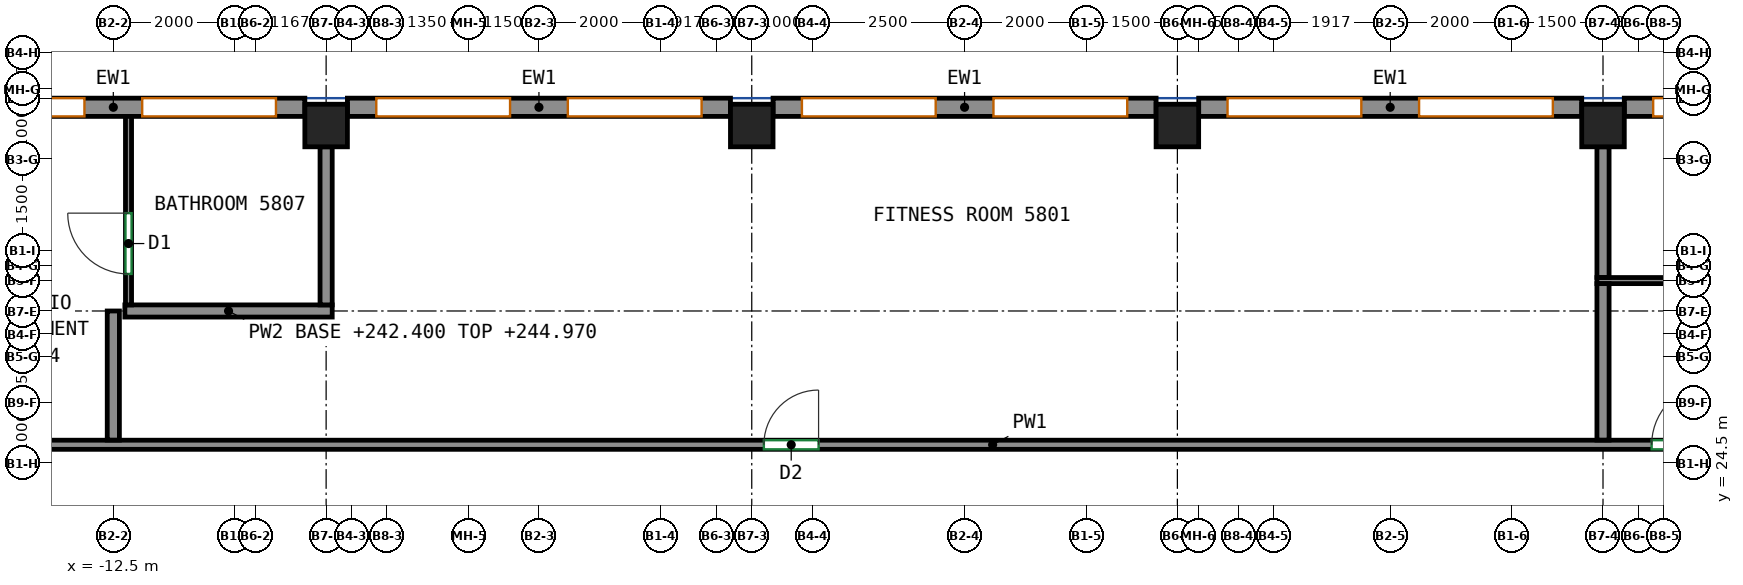
"""IFC4 building model, lengths in metres.
Left out: names, types, materials, properties, quantities, classifications, styles, units other than length and angle.
Written with IfcOpenShell. Run it as: python <this file> out.ifc"""

import sys

from ifc_helpers import new_model, si_unit, direction, frame, frame_2d, origin, origin_2d, place, context, subcontext, project, spatial, rectangle, extrude, source, transform, mapped, element, fill, save


model = new_model("IFC4")
c1 = context("Model", 3, precision=1e-05, world=origin(), true_north=direction((0.0, 1.0)))
c2 = subcontext(c1, "Body", "Model", "MODEL_VIEW")
j1 = project(units=[si_unit("LENGTHUNIT", "METRE"), si_unit("PLANEANGLEUNIT", "RADIAN")], contexts=[c1])
p1 = place(None, origin())
s1 = spatial("IfcSite", under=j1, at=p1, CompositionType="ELEMENT")
p2 = place(p1, origin())
s2 = spatial("IfcBuilding", under=s1, at=p2, CompositionType="ELEMENT")
p3 = place(p2, frame((0.0, 0.0, 242.4)))
s3 = spatial("IfcBuildingStorey", under=s2, at=p3, CompositionType="ELEMENT", Elevation=242.4)
m1 = source(origin(), c2, "Body", "SweptSolid", [
    extrude(rectangle(XDim=0.7, YDim=0.7, at=origin_2d()), origin(), (0.0, 0.0, 1.0), 3.12),
])
for number, where, z_axis, x_axis in (
    (1, (-9.0, 30.05, 0.0), (0.0, 0.0, 1.0), (1.0, 0.0, 0.0)),
    (2, (-2.0, 30.05, 0.0), (0.0, 0.0, 1.0), (1.0, 0.0, 0.0)),
    (3, (5.0, 30.05, 0.0), (0.0, 0.0, 1.0), (1.0, 0.0, 0.0)),
    (4, (12.0, 30.05, 0.0), (0.0, 0.0, 1.0), (1.0, 0.0, 0.0)),
):
    element("IfcColumn", number, at=place(p3, frame(where, z_axis=z_axis, x_axis=x_axis)), inside=s3, PredefinedType="COLUMN", context=c2, shape_type="MappedRepresentation", body=[
        mapped(m1, transform((0.0, 0.0, 0.0))),
    ])
m2 = source(origin(), c2, "Body", "SweptSolid", [
    extrude(rectangle(XDim=6.3, YDim=0.3, at=frame_2d((3.15, 0.0))), origin(), (0.0, 0.0, 1.0), 3.12),
])
p4 = place(p3, frame((18.65, 30.35, 0.0), z_axis=(0.0, 0.0, 1.0), x_axis=(-1.0, 0.0, 0.0)))
e5 = element("IfcWall", 5, at=p4, inside=s3, PredefinedType="SOLIDWALL", context=c2, shape_type="MappedRepresentation", body=[
    mapped(m2, transform((0.0, 0.0, 0.0))),
])
p5 = place(p4, frame((0.475, 0.0, 0.8)))
e6 = element("IfcOpeningElement", 6, at=p5, cuts=e5, PredefinedType="OPENING", context=c2, shape_type="SweptSolid", body=[
    extrude(rectangle(XDim=2.2, YDim=2.05, at=frame_2d((1.1, 1.025))), frame((0.0, 0.16, 0.0), z_axis=(0.0, -1.0, 0.0), x_axis=(1.0, 0.0, 0.0)), (0.0, 0.0, 1.0), 0.32),
])
p6 = place(p4, frame((3.625, 0.0, 0.8)))
e7 = element("IfcOpeningElement", 7, at=p6, cuts=e5, PredefinedType="OPENING", context=c2, shape_type="SweptSolid", body=[
    extrude(rectangle(XDim=2.2, YDim=2.05, at=frame_2d((1.1, 1.025))), frame((0.0, 0.16, 0.0), z_axis=(0.0, -1.0, 0.0), x_axis=(1.0, 0.0, 0.0)), (0.0, 0.0, 1.0), 0.32),
])
p7 = place(p3, frame((11.65, 30.35, 0.0), z_axis=(0.0, 0.0, 1.0), x_axis=(-1.0, 0.0, 0.0)))
e8 = element("IfcWall", 8, at=p7, inside=s3, PredefinedType="SOLIDWALL", context=c2, shape_type="MappedRepresentation", body=[
    mapped(m2, transform((0.0, 0.0, 0.0))),
])
p8 = place(p7, frame((0.475, 0.0, 0.8)))
e9 = element("IfcOpeningElement", 9, at=p8, cuts=e8, PredefinedType="OPENING", context=c2, shape_type="SweptSolid", body=[
    extrude(rectangle(XDim=2.2, YDim=2.05, at=frame_2d((1.1, 1.025))), frame((0.0, 0.16, 0.0), z_axis=(0.0, -1.0, 0.0), x_axis=(1.0, 0.0, 0.0)), (0.0, 0.0, 1.0), 0.32),
])
p9 = place(p7, frame((3.625, 0.0, 0.8)))
e10 = element("IfcOpeningElement", 10, at=p9, cuts=e8, PredefinedType="OPENING", context=c2, shape_type="SweptSolid", body=[
    extrude(rectangle(XDim=2.2, YDim=2.05, at=frame_2d((1.1, 1.025))), frame((0.0, 0.16, 0.0), z_axis=(0.0, -1.0, 0.0), x_axis=(1.0, 0.0, 0.0)), (0.0, 0.0, 1.0), 0.32),
])
p10 = place(p3, frame((4.65, 30.35, 0.0), z_axis=(0.0, 0.0, 1.0), x_axis=(-1.0, 0.0, 0.0)))
e11 = element("IfcWall", 11, at=p10, inside=s3, PredefinedType="SOLIDWALL", context=c2, shape_type="MappedRepresentation", body=[
    mapped(m2, transform((0.0, 0.0, 0.0))),
])
p11 = place(p10, frame((0.475, 0.0, 0.8)))
e12 = element("IfcOpeningElement", 12, at=p11, cuts=e11, PredefinedType="OPENING", context=c2, shape_type="SweptSolid", body=[
    extrude(rectangle(XDim=2.2, YDim=2.05, at=frame_2d((1.1, 1.025))), frame((0.0, 0.16, 0.0), z_axis=(0.0, -1.0, 0.0), x_axis=(1.0, 0.0, 0.0)), (0.0, 0.0, 1.0), 0.32),
])
p12 = place(p10, frame((3.625, 0.0, 0.8)))
e13 = element("IfcOpeningElement", 13, at=p12, cuts=e11, PredefinedType="OPENING", context=c2, shape_type="SweptSolid", body=[
    extrude(rectangle(XDim=2.2, YDim=2.05, at=frame_2d((1.1, 1.025))), frame((0.0, 0.16, 0.0), z_axis=(0.0, -1.0, 0.0), x_axis=(1.0, 0.0, 0.0)), (0.0, 0.0, 1.0), 0.32),
])
p13 = place(p3, frame((-2.35, 30.35, 0.0), z_axis=(0.0, 0.0, 1.0), x_axis=(-1.0, 0.0, 0.0)))
e14 = element("IfcWall", 14, at=p13, inside=s3, PredefinedType="SOLIDWALL", context=c2, shape_type="MappedRepresentation", body=[
    mapped(m2, transform((0.0, 0.0, 0.0))),
])
p14 = place(p13, frame((0.475, 0.0, 0.8)))
e15 = element("IfcOpeningElement", 15, at=p14, cuts=e14, PredefinedType="OPENING", context=c2, shape_type="SweptSolid", body=[
    extrude(rectangle(XDim=2.2, YDim=2.05, at=frame_2d((1.1, 1.025))), frame((0.0, 0.16, 0.0), z_axis=(0.0, -1.0, 0.0), x_axis=(1.0, 0.0, 0.0)), (0.0, 0.0, 1.0), 0.32),
])
p15 = place(p13, frame((3.625, 0.0, 0.8)))
e16 = element("IfcOpeningElement", 16, at=p15, cuts=e14, PredefinedType="OPENING", context=c2, shape_type="SweptSolid", body=[
    extrude(rectangle(XDim=2.2, YDim=2.05, at=frame_2d((1.1, 1.025))), frame((0.0, 0.16, 0.0), z_axis=(0.0, -1.0, 0.0), x_axis=(1.0, 0.0, 0.0)), (0.0, 0.0, 1.0), 0.32),
])
p16 = place(p3, frame((-9.35, 30.35, 0.0), z_axis=(0.0, 0.0, 1.0), x_axis=(-1.0, 0.0, 0.0)))
e17 = element("IfcWall", 17, at=p16, inside=s3, PredefinedType="SOLIDWALL", context=c2, shape_type="MappedRepresentation", body=[
    mapped(m2, transform((0.0, 0.0, 0.0))),
])
p17 = place(p16, frame((0.475, 0.0, 0.8)))
e18 = element("IfcOpeningElement", 18, at=p17, cuts=e17, PredefinedType="OPENING", context=c2, shape_type="SweptSolid", body=[
    extrude(rectangle(XDim=2.2, YDim=2.05, at=frame_2d((1.1, 1.025))), frame((0.0, 0.16, 0.0), z_axis=(0.0, -1.0, 0.0), x_axis=(1.0, 0.0, 0.0)), (0.0, 0.0, 1.0), 0.32),
])
p18 = place(p16, frame((3.625, 0.0, 0.8)))
e19 = element("IfcOpeningElement", 19, at=p18, cuts=e17, PredefinedType="OPENING", context=c2, shape_type="SweptSolid", body=[
    extrude(rectangle(XDim=2.2, YDim=2.05, at=frame_2d((1.1, 1.025))), frame((0.0, 0.16, 0.0), z_axis=(0.0, -1.0, 0.0), x_axis=(1.0, 0.0, 0.0)), (0.0, 0.0, 1.0), 0.32),
])
p19 = place(p3, frame((-16.075, 24.8, 0.0), z_axis=(0.0, 0.0, 1.0), x_axis=(1.0, 0.0, 0.0)))
e20 = element("IfcWall", 20, at=p19, inside=s3, PredefinedType="PARTITIONING", context=c2, shape_type="SweptSolid", body=[
    extrude(rectangle(XDim=36.073, YDim=0.15, at=frame_2d((18.037, 0.0))), origin(), (0.0, 0.0, 1.0), 3.12),
])
p20 = place(p19, frame((14.274, 0.0, 0.0)))
e21 = element("IfcOpeningElement", 21, at=p20, cuts=e20, PredefinedType="OPENING", context=c2, shape_type="SweptSolid", body=[
    extrude(rectangle(XDim=0.9, YDim=2.1, at=frame_2d((0.45, 1.05))), frame((0.0, 0.085, 0.0), z_axis=(0.0, -1.0, 0.0), x_axis=(1.0, 0.0, 0.0)), (0.0, 0.0, 1.0), 0.17),
])
p21 = place(p19, frame((28.875, 0.0, 0.0)))
e22 = element("IfcOpeningElement", 22, at=p21, cuts=e20, PredefinedType="OPENING", context=c2, shape_type="SweptSolid", body=[
    extrude(rectangle(XDim=1.0, YDim=2.1, at=frame_2d((0.5, 1.05))), frame((0.0, 0.085, 0.0), z_axis=(0.0, -1.0, 0.0), x_axis=(1.0, 0.0, 0.0)), (0.0, 0.0, 1.0), 0.17),
])
p22 = place(p3, frame((11.9, 27.5, 0.0), z_axis=(0.0, 0.0, 1.0), x_axis=(1.0, 0.0, 0.0)))
e23 = element("IfcWall", 23, at=p22, inside=s3, PredefinedType="PARTITIONING", context=c2, shape_type="SweptSolid", body=[
    extrude(rectangle(XDim=10.66, YDim=0.1, at=frame_2d((5.33, 0.0))), origin(), (0.0, 0.0, 1.0), 3.12),
])
p23 = place(p22, frame((2.02, 0.0, 0.0)))
e24 = element("IfcOpeningElement", 24, at=p23, cuts=e23, PredefinedType="OPENING", context=c2, shape_type="SweptSolid", body=[
    extrude(rectangle(XDim=1.0, YDim=2.1, at=frame_2d((0.5, 1.05))), frame((0.0, 0.06, 0.0), z_axis=(0.0, -1.0, 0.0), x_axis=(1.0, 0.0, 0.0)), (0.0, 0.0, 1.0), 0.12),
])
p24 = place(p3, frame((12.0, 24.877, 0.0), z_axis=(0.0, 0.0, 1.0), x_axis=(0.0, 1.0, 0.0)))
e25 = element("IfcWall", 25, at=p24, inside=s3, PredefinedType="PARTITIONING", context=c2, shape_type="SweptSolid", body=[
    extrude(rectangle(XDim=2.573, YDim=0.2, at=frame_2d((1.287, 0.0))), origin(), (0.0, 0.0, 1.0), 3.12),
])
p25 = place(p3, frame((12.0, 27.552, 0.0), z_axis=(0.0, 0.0, 1.0), x_axis=(0.0, 1.0, 0.0)))
e26 = element("IfcWall", 26, at=p25, inside=s3, PredefinedType="PARTITIONING", context=c2, shape_type="SweptSolid", body=[
    extrude(rectangle(XDim=2.148, YDim=0.2, at=frame_2d((1.074, 0.0))), origin(), (0.0, 0.0, 1.0), 3.12),
])
p26 = place(p3, frame((-12.5, 27.0, 0.0), z_axis=(0.0, 0.0, 1.0), x_axis=(0.0, -1.0, 0.0)))
e27 = element("IfcWall", 27, at=p26, inside=s3, PredefinedType="PARTITIONING", context=c2, shape_type="SweptSolid", body=[
    extrude(rectangle(XDim=2.123, YDim=0.2, at=frame_2d((1.062, 0.0))), origin(), (0.0, 0.0, 1.0), 3.12),
])
p27 = place(p3, frame((-8.9, 27.0, 0.0), z_axis=(0.0, 0.0, 1.0), x_axis=(-1.0, 0.0, 0.0)))
e28 = element("IfcWall", 28, at=p27, inside=s3, PredefinedType="PARTITIONING", context=c2, shape_type="SweptSolid", body=[
    extrude(rectangle(XDim=3.41, YDim=0.2, at=frame_2d((1.705, 0.0))), origin(), (0.0, 0.0, 1.0), 2.57),
])
p28 = place(p3, frame((-9.0, 27.1, 0.0), z_axis=(0.0, 0.0, 1.0), x_axis=(0.0, 1.0, 0.0)))
e29 = element("IfcWall", 29, at=p28, inside=s3, PredefinedType="PARTITIONING", context=c2, shape_type="SweptSolid", body=[
    extrude(rectangle(XDim=2.6, YDim=0.2, at=frame_2d((1.3, 0.0))), origin(), (0.0, 0.0, 1.0), 3.12),
])
p29 = place(p3, frame((-12.25, 27.1, 0.0), z_axis=(0.0, 0.0, 1.0), x_axis=(0.0, 1.0, 0.0)))
e30 = element("IfcWall", 30, at=p29, inside=s3, PredefinedType="PARTITIONING", context=c2, shape_type="SweptSolid", body=[
    extrude(rectangle(XDim=3.15, YDim=0.1, at=frame_2d((1.575, 0.0))), origin(), (0.0, 0.0, 1.0), 3.12),
])
p30 = place(p29, frame((0.509, 0.0, 0.0)))
e31 = element("IfcOpeningElement", 31, at=p30, cuts=e30, PredefinedType="OPENING", context=c2, shape_type="SweptSolid", body=[
    extrude(rectangle(XDim=1.0, YDim=2.1, at=frame_2d((0.5, 1.05))), frame((0.0, 0.06, 0.0), z_axis=(0.0, -1.0, 0.0), x_axis=(1.0, 0.0, 0.0)), (0.0, 0.0, 1.0), 0.12),
])
p31 = place(p6, origin())
e32 = element("IfcWindow", 32, at=p31, inside=s3, PartitioningType="SINGLE_PANEL", PredefinedType="WINDOW", context=c2, shape_type="SweptSolid", body=[
    extrude(rectangle(XDim=2.2, YDim=2.05, at=frame_2d((1.1, 1.025))), frame((0.0, 0.03, 0.0), z_axis=(0.0, -1.0, 0.0), x_axis=(1.0, 0.0, 0.0)), (0.0, 0.0, 1.0), 0.06),
])
fill(e7, e32)
p32 = place(p8, origin())
e33 = element("IfcWindow", 33, at=p32, inside=s3, PartitioningType="SINGLE_PANEL", PredefinedType="WINDOW", context=c2, shape_type="SweptSolid", body=[
    extrude(rectangle(XDim=2.2, YDim=2.05, at=frame_2d((1.1, 1.025))), frame((0.0, 0.03, 0.0), z_axis=(0.0, -1.0, 0.0), x_axis=(1.0, 0.0, 0.0)), (0.0, 0.0, 1.0), 0.06),
])
fill(e9, e33)
p33 = place(p9, origin())
e34 = element("IfcWindow", 34, at=p33, inside=s3, PartitioningType="SINGLE_PANEL", PredefinedType="WINDOW", context=c2, shape_type="SweptSolid", body=[
    extrude(rectangle(XDim=2.2, YDim=2.05, at=frame_2d((1.1, 1.025))), frame((0.0, 0.03, 0.0), z_axis=(0.0, -1.0, 0.0), x_axis=(1.0, 0.0, 0.0)), (0.0, 0.0, 1.0), 0.06),
])
fill(e10, e34)
p34 = place(p11, origin())
e35 = element("IfcWindow", 35, at=p34, inside=s3, PartitioningType="SINGLE_PANEL", PredefinedType="WINDOW", context=c2, shape_type="SweptSolid", body=[
    extrude(rectangle(XDim=2.2, YDim=2.05, at=frame_2d((1.1, 1.025))), frame((0.0, 0.03, 0.0), z_axis=(0.0, -1.0, 0.0), x_axis=(1.0, 0.0, 0.0)), (0.0, 0.0, 1.0), 0.06),
])
fill(e12, e35)
p35 = place(p12, origin())
e36 = element("IfcWindow", 36, at=p35, inside=s3, PartitioningType="SINGLE_PANEL", PredefinedType="WINDOW", context=c2, shape_type="SweptSolid", body=[
    extrude(rectangle(XDim=2.2, YDim=2.05, at=frame_2d((1.1, 1.025))), frame((0.0, 0.03, 0.0), z_axis=(0.0, -1.0, 0.0), x_axis=(1.0, 0.0, 0.0)), (0.0, 0.0, 1.0), 0.06),
])
fill(e13, e36)
p36 = place(p14, origin())
e37 = element("IfcWindow", 37, at=p36, inside=s3, PartitioningType="SINGLE_PANEL", PredefinedType="WINDOW", context=c2, shape_type="SweptSolid", body=[
    extrude(rectangle(XDim=2.2, YDim=2.05, at=frame_2d((1.1, 1.025))), frame((0.0, 0.03, 0.0), z_axis=(0.0, -1.0, 0.0), x_axis=(1.0, 0.0, 0.0)), (0.0, 0.0, 1.0), 0.06),
])
fill(e15, e37)
p37 = place(p15, origin())
e38 = element("IfcWindow", 38, at=p37, inside=s3, PartitioningType="SINGLE_PANEL", PredefinedType="WINDOW", context=c2, shape_type="SweptSolid", body=[
    extrude(rectangle(XDim=2.2, YDim=2.05, at=frame_2d((1.1, 1.025))), frame((0.0, 0.03, 0.0), z_axis=(0.0, -1.0, 0.0), x_axis=(1.0, 0.0, 0.0)), (0.0, 0.0, 1.0), 0.06),
])
fill(e16, e38)
p38 = place(p17, origin())
e39 = element("IfcWindow", 39, at=p38, inside=s3, PartitioningType="SINGLE_PANEL", PredefinedType="WINDOW", context=c2, shape_type="SweptSolid", body=[
    extrude(rectangle(XDim=2.2, YDim=2.05, at=frame_2d((1.1, 1.025))), frame((0.0, 0.03, 0.0), z_axis=(0.0, -1.0, 0.0), x_axis=(1.0, 0.0, 0.0)), (0.0, 0.0, 1.0), 0.06),
])
fill(e18, e39)
p39 = place(p18, origin())
e40 = element("IfcWindow", 40, at=p39, inside=s3, PartitioningType="SINGLE_PANEL", PredefinedType="WINDOW", context=c2, shape_type="SweptSolid", body=[
    extrude(rectangle(XDim=2.2, YDim=2.05, at=frame_2d((1.1, 1.025))), frame((0.0, 0.03, 0.0), z_axis=(0.0, -1.0, 0.0), x_axis=(1.0, 0.0, 0.0)), (0.0, 0.0, 1.0), 0.06),
])
fill(e19, e40)
p40 = place(p20, origin())
e41 = element("IfcDoor", 41, at=p40, inside=s3, OperationType="SINGLE_SWING_RIGHT", PredefinedType="DOOR", context=c2, shape_type="SweptSolid", body=[
    extrude(rectangle(XDim=0.9, YDim=2.1, at=frame_2d((0.45, 1.05))), frame((0.0, 0.025, 0.0), z_axis=(0.0, -1.0, 0.0), x_axis=(1.0, 0.0, 0.0)), (0.0, 0.0, 1.0), 0.05),
])
fill(e21, e41)
p41 = place(p21, origin())
e42 = element("IfcDoor", 42, at=p41, inside=s3, OperationType="SINGLE_SWING_RIGHT", PredefinedType="DOOR", context=c2, shape_type="SweptSolid", body=[
    extrude(rectangle(XDim=1.0, YDim=2.1, at=frame_2d((0.5, 1.05))), frame((0.0, 0.025, 0.0), z_axis=(0.0, -1.0, 0.0), x_axis=(1.0, 0.0, 0.0)), (0.0, 0.0, 1.0), 0.05),
])
fill(e22, e42)
p42 = place(p30, origin())
e43 = element("IfcDoor", 43, at=p42, inside=s3, OperationType="SINGLE_SWING_RIGHT", PredefinedType="DOOR", context=c2, shape_type="SweptSolid", body=[
    extrude(rectangle(XDim=1.0, YDim=2.1, at=frame_2d((0.5, 1.05))), frame((0.0, 0.025, 0.0), z_axis=(0.0, -1.0, 0.0), x_axis=(1.0, 0.0, 0.0)), (0.0, 0.0, 1.0), 0.05),
])
fill(e31, e43)
save(model, sys.argv[1])
